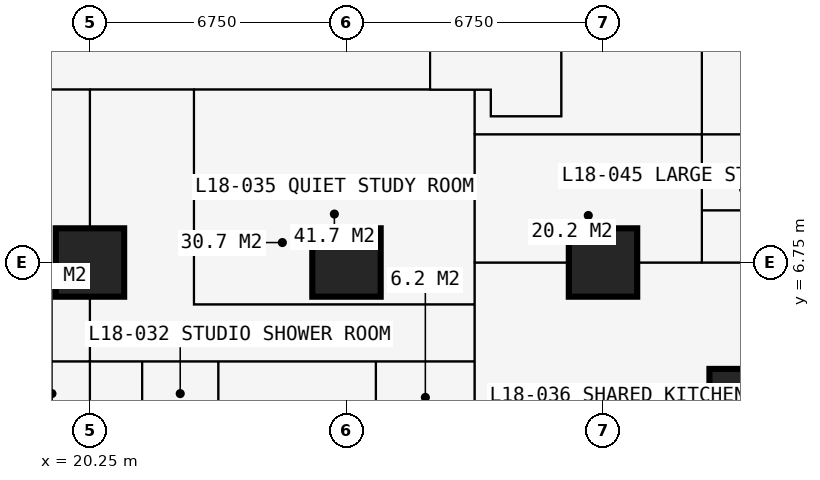
"""IFC4 building model, lengths in metres.
Left out: names, types, materials, properties, quantities, classifications, styles, units other than length and angle.
Written with IfcOpenShell. Run it as: python <this file> out.ifc"""

import sys

from ifc_helpers import new_model, si_unit, direction, frame, frame_2d, origin, origin_2d, place, context, subcontext, project, spatial, rectangle, extrude, element, fill, save


model = new_model("IFC4")
c1 = context("Model", 3, precision=1e-05, world=origin(), true_north=direction((0.0, 1.0)))
c2 = subcontext(c1, "Body", "Model", "MODEL_VIEW")
j1 = project(units=[si_unit("LENGTHUNIT", "METRE"), si_unit("PLANEANGLEUNIT", "RADIAN")], contexts=[c1])
p1 = place(None, origin())
s1 = spatial("IfcSite", under=j1, at=p1, CompositionType="ELEMENT")
p2 = place(p1, origin())
s2 = spatial("IfcBuilding", under=s1, at=p2, CompositionType="ELEMENT")
p3 = place(p2, frame((0.0, 0.0, 68.4)))
s3 = spatial("IfcBuildingStorey", under=s2, at=p3, CompositionType="ELEMENT", Elevation=68.4)
for number, where, z_axis, x_axis in (
    (1, (20.25, 6.75, 0.0), (0.0, 0.0, 1.0), (1.0, 0.0, 0.0)),
    (2, (27.0, 6.75, 0.0), (0.0, 0.0, 1.0), (1.0, 0.0, 0.0)),
    (3, (33.75, 6.75, 0.0), (0.0, 0.0, 1.0), (1.0, 0.0, 0.0)),
):
    element("IfcColumn", number, at=place(p3, frame(where, z_axis=z_axis, x_axis=x_axis)), inside=s3, PredefinedType="COLUMN", context=c2, shape_type="SweptSolid", body=[
        extrude(rectangle(XDim=1.8, YDim=1.8, at=origin_2d()), origin(), (0.0, 0.0, 1.0), 3.6),
    ])
p4 = place(p3, frame((37.125, 3.375, 0.0), z_axis=(0.0, 0.0, 1.0), x_axis=(1.0, 0.0, 0.0)))
e4 = element("IfcColumn", 4, at=p4, inside=s3, PredefinedType="COLUMN", context=c2, shape_type="SweptSolid", body=[
    extrude(rectangle(XDim=1.15, YDim=1.15, at=origin_2d()), origin(), (0.0, 0.0, 1.0), 3.6),
])
p5 = place(p3, frame((6.75, 4.15, 0.0), z_axis=(0.0, 0.0, 1.0), x_axis=(1.0, 0.0, 0.0)))
e5 = element("IfcWall", 5, at=p5, inside=s3, PredefinedType="PARTITIONING", context=c2, shape_type="SweptSolid", body=[
    extrude(rectangle(XDim=23.625, YDim=0.1, at=frame_2d((11.812, 0.0))), origin(), (0.0, 0.0, 1.0), 3.375),
])
p6 = place(p5, frame((0.2, 0.0, 0.0)))
e6 = element("IfcOpeningElement", 6, at=p6, cuts=e5, PredefinedType="OPENING", context=c2, shape_type="SweptSolid", body=[
    extrude(rectangle(XDim=0.95, YDim=2.2, at=frame_2d((0.475, 1.1))), frame((0.0, 0.06, 0.0), z_axis=(0.0, -1.0, 0.0), x_axis=(1.0, 0.0, 0.0)), (0.0, 0.0, 1.0), 0.12),
])
p7 = place(p5, frame((3.625, 0.0, 0.0)))
e7 = element("IfcOpeningElement", 7, at=p7, cuts=e5, PredefinedType="OPENING", context=c2, shape_type="SweptSolid", body=[
    extrude(rectangle(XDim=0.95, YDim=2.2, at=frame_2d((0.475, 1.1))), frame((0.0, 0.06, 0.0), z_axis=(0.0, -1.0, 0.0), x_axis=(1.0, 0.0, 0.0)), (0.0, 0.0, 1.0), 0.12),
])
p8 = place(p5, frame((7.0, 0.0, 0.0)))
e8 = element("IfcOpeningElement", 8, at=p8, cuts=e5, PredefinedType="OPENING", context=c2, shape_type="SweptSolid", body=[
    extrude(rectangle(XDim=0.95, YDim=2.2, at=frame_2d((0.475, 1.1))), frame((0.0, 0.06, 0.0), z_axis=(0.0, -1.0, 0.0), x_axis=(1.0, 0.0, 0.0)), (0.0, 0.0, 1.0), 0.12),
])
p9 = place(p5, frame((10.375, 0.0, 0.0)))
e9 = element("IfcOpeningElement", 9, at=p9, cuts=e5, PredefinedType="OPENING", context=c2, shape_type="SweptSolid", body=[
    extrude(rectangle(XDim=0.95, YDim=2.2, at=frame_2d((0.475, 1.1))), frame((0.0, 0.06, 0.0), z_axis=(0.0, -1.0, 0.0), x_axis=(1.0, 0.0, 0.0)), (0.0, 0.0, 1.0), 0.12),
])
p10 = place(p5, frame((18.475, 0.0, 0.0)))
e10 = element("IfcOpeningElement", 10, at=p10, cuts=e5, PredefinedType="OPENING", context=c2, shape_type="SweptSolid", body=[
    extrude(rectangle(XDim=0.95, YDim=2.2, at=frame_2d((0.475, 1.1))), frame((0.0, 0.06, 0.0), z_axis=(0.0, -1.0, 0.0), x_axis=(1.0, 0.0, 0.0)), (0.0, 0.0, 1.0), 0.12),
])
p11 = place(p5, frame((13.7, 0.0, 0.0)))
e11 = element("IfcOpeningElement", 11, at=p11, cuts=e5, PredefinedType="OPENING", context=c2, shape_type="SweptSolid", body=[
    extrude(rectangle(XDim=0.95, YDim=2.2, at=frame_2d((0.475, 1.1))), frame((0.0, 0.06, 0.0), z_axis=(0.0, -1.0, 0.0), x_axis=(1.0, 0.0, 0.0)), (0.0, 0.0, 1.0), 0.12),
])
p12 = place(p3, frame((10.125, 11.3, 0.0), z_axis=(0.0, 0.0, 1.0), x_axis=(1.0, 0.0, 0.0)))
e12 = element("IfcWall", 12, at=p12, inside=s3, PredefinedType="PARTITIONING", context=c2, shape_type="SweptSolid", body=[
    extrude(rectangle(XDim=20.675, YDim=0.15, at=frame_2d((10.337, 0.0))), origin(), (0.0, 0.0, 1.0), 3.375),
])
p13 = place(p12, frame((8.375, 0.0, 0.0)))
e13 = element("IfcOpeningElement", 13, at=p13, cuts=e12, PredefinedType="OPENING", context=c2, shape_type="SweptSolid", body=[
    extrude(rectangle(XDim=1.0, YDim=2.2, at=frame_2d((0.5, 1.1))), frame((0.0, 0.085, 0.0), z_axis=(0.0, -1.0, 0.0), x_axis=(1.0, 0.0, 0.0)), (0.0, 0.0, 1.0), 0.17),
])
p14 = place(p12, frame((10.975, 0.0, 0.0)))
e14 = element("IfcOpeningElement", 14, at=p14, cuts=e12, PredefinedType="OPENING", context=c2, shape_type="SweptSolid", body=[
    extrude(rectangle(XDim=1.0, YDim=2.2, at=frame_2d((0.5, 1.1))), frame((0.0, 0.085, 0.0), z_axis=(0.0, -1.0, 0.0), x_axis=(1.0, 0.0, 0.0)), (0.0, 0.0, 1.0), 0.17),
])
p15 = place(p12, frame((3.925, 0.0, 0.0)))
e15 = element("IfcOpeningElement", 15, at=p15, cuts=e12, PredefinedType="OPENING", context=c2, shape_type="SweptSolid", body=[
    extrude(rectangle(XDim=0.95, YDim=2.2, at=frame_2d((0.475, 1.1))), frame((0.0, 0.085, 0.0), z_axis=(0.0, -1.0, 0.0), x_axis=(1.0, 0.0, 0.0)), (0.0, 0.0, 1.0), 0.17),
])
p16 = place(p3, frame((20.25, -0.734, 0.0), z_axis=(0.0, 0.0, 1.0), x_axis=(0.0, 1.0, 0.0)))
e16 = element("IfcWall", 16, at=p16, inside=s3, PredefinedType="PARTITIONING", context=c2, shape_type="SweptSolid", body=[
    extrude(rectangle(XDim=12.034, YDim=0.15, at=frame_2d((6.017, 0.0))), origin(), (0.0, 0.0, 1.0), 2.61),
])
p17 = place(p3, frame((21.625, 1.95, 0.0), z_axis=(0.0, 0.0, 1.0), x_axis=(0.0, 1.0, 0.0)))
e17 = element("IfcWall", 17, at=p17, inside=s3, PredefinedType="PARTITIONING", context=c2, shape_type="SweptSolid", body=[
    extrude(rectangle(XDim=2.2, YDim=0.1, at=frame_2d((1.1, 0.0))), origin(), (0.0, 0.0, 1.0), 3.375),
])
p18 = place(p3, frame((22.988, 5.65, 0.0), z_axis=(0.0, 0.0, 1.0), x_axis=(1.0, 0.0, 0.0)))
e18 = element("IfcWall", 18, at=p18, inside=s3, PredefinedType="PARTITIONING", context=c2, shape_type="SweptSolid", body=[
    extrude(rectangle(XDim=7.387, YDim=0.15, at=frame_2d((3.694, 0.0))), origin(), (0.0, 0.0, 1.0), 3.375),
])
p19 = place(p18, frame((2.15, 0.0, 0.0)))
e19 = element("IfcOpeningElement", 19, at=p19, cuts=e18, PredefinedType="OPENING", context=c2, shape_type="SweptSolid", body=[
    extrude(rectangle(XDim=0.95, YDim=2.2, at=frame_2d((0.475, 1.1))), frame((0.0, 0.085, 0.0), z_axis=(0.0, -1.0, 0.0), x_axis=(1.0, 0.0, 0.0)), (0.0, 0.0, 1.0), 0.17),
])
p20 = place(p3, frame((22.988, 5.65, 0.0), z_axis=(0.0, 0.0, 1.0), x_axis=(0.0, 1.0, 0.0)))
e20 = element("IfcWall", 20, at=p20, inside=s3, PredefinedType="PARTITIONING", context=c2, shape_type="SweptSolid", body=[
    extrude(rectangle(XDim=5.65, YDim=0.15, at=frame_2d((2.825, 0.0))), origin(), (0.0, 0.0, 1.0), 3.375),
])
p21 = place(p3, frame((23.625, -0.734, 0.0), z_axis=(0.0, 0.0, 1.0), x_axis=(0.0, 1.0, 0.0)))
e21 = element("IfcWall", 21, at=p21, inside=s3, PredefinedType="PARTITIONING", context=c2, shape_type="SweptSolid", body=[
    extrude(rectangle(XDim=4.884, YDim=0.175, at=frame_2d((2.442, 0.0))), origin(), (0.0, 0.0, 1.0), 3.375),
])
p22 = place(p21, frame((3.334, 0.0, 0.0)))
e22 = element("IfcOpeningElement", 22, at=p22, cuts=e21, PredefinedType="OPENING", context=c2, shape_type="SweptSolid", body=[
    extrude(rectangle(XDim=0.9, YDim=2.2, at=frame_2d((0.45, 1.1))), frame((0.0, 0.097, 0.0), z_axis=(0.0, -1.0, 0.0), x_axis=(1.0, 0.0, 0.0)), (0.0, 0.0, 1.0), 0.195),
])
p23 = place(p3, frame((27.775, 1.75, 0.0), z_axis=(0.0, 0.0, 1.0), x_axis=(0.0, 1.0, 0.0)))
e23 = element("IfcWall", 23, at=p23, inside=s3, PredefinedType="PARTITIONING", context=c2, shape_type="SweptSolid", body=[
    extrude(rectangle(XDim=2.4, YDim=0.1, at=frame_2d((1.2, 0.0))), origin(), (0.0, 0.0, 1.0), 3.375),
])
p24 = place(p3, frame((29.2, 11.3, 0.0), z_axis=(0.0, 0.0, 1.0), x_axis=(0.0, 1.0, 0.0)))
e24 = element("IfcWall", 24, at=p24, inside=s3, PredefinedType="PARTITIONING", context=c2, shape_type="SweptSolid", body=[
    extrude(rectangle(XDim=17.9, YDim=0.2, at=frame_2d((8.95, 0.0))), origin(), (0.0, 0.0, 1.0), 3.375),
])
p25 = place(p24, frame((8.35, 0.0, 0.0)))
e25 = element("IfcOpeningElement", 25, at=p25, cuts=e24, PredefinedType="OPENING", context=c2, shape_type="SweptSolid", body=[
    extrude(rectangle(XDim=1.2, YDim=2.2, at=frame_2d((0.6, 1.1))), frame((0.0, 0.11, 0.0), z_axis=(0.0, -1.0, 0.0), x_axis=(1.0, 0.0, 0.0)), (0.0, 0.0, 1.0), 0.22),
])
p26 = place(p3, frame((30.375, -0.734, 0.0), z_axis=(0.0, 0.0, 1.0), x_axis=(0.0, 1.0, 0.0)))
e26 = element("IfcWall", 26, at=p26, inside=s3, PredefinedType="PARTITIONING", context=c2, shape_type="SweptSolid", body=[
    extrude(rectangle(XDim=12.034, YDim=0.15, at=frame_2d((6.017, 0.0))), origin(), (0.0, 0.0, 1.0), 3.375),
])
p27 = place(p3, frame((30.375, 6.75, 0.0), z_axis=(0.0, 0.0, 1.0), x_axis=(1.0, 0.0, 0.0)))
e27 = element("IfcWall", 27, at=p27, inside=s3, PredefinedType="PARTITIONING", context=c2, shape_type="SweptSolid", body=[
    extrude(rectangle(XDim=10.859, YDim=0.15, at=frame_2d((5.429, 0.0))), origin(), (0.0, 0.0, 1.0), 2.877),
])
p28 = place(p27, frame((1.45, 0.0, 0.0)))
e28 = element("IfcOpeningElement", 28, at=p28, cuts=e27, PredefinedType="OPENING", context=c2, shape_type="SweptSolid", body=[
    extrude(rectangle(XDim=1.0, YDim=2.2, at=frame_2d((0.5, 1.1))), frame((0.0, 0.085, 0.0), z_axis=(0.0, -1.0, 0.0), x_axis=(1.0, 0.0, 0.0)), (0.0, 0.0, 1.0), 0.17),
])
p29 = place(p3, frame((30.375, 10.125, 0.0), z_axis=(0.0, 0.0, 1.0), x_axis=(1.0, 0.0, 0.0)))
e29 = element("IfcWall", 29, at=p29, inside=s3, PredefinedType="PARTITIONING", context=c2, shape_type="SweptSolid", body=[
    extrude(rectangle(XDim=10.859, YDim=0.15, at=frame_2d((5.429, 0.0))), origin(), (0.0, 0.0, 1.0), 3.375),
])
p30 = place(p29, frame((2.5, 0.0, 0.0)))
e30 = element("IfcOpeningElement", 30, at=p30, cuts=e29, PredefinedType="OPENING", context=c2, shape_type="SweptSolid", body=[
    extrude(rectangle(XDim=1.0, YDim=2.2, at=frame_2d((0.5, 1.1))), frame((0.0, 0.085, 0.0), z_axis=(0.0, -1.0, 0.0), x_axis=(1.0, 0.0, 0.0)), (0.0, 0.0, 1.0), 0.17),
])
p31 = place(p3, frame((30.8, 10.6, 0.0), z_axis=(0.0, 0.0, 1.0), x_axis=(0.0, 1.0, 0.0)))
e31 = element("IfcWall", 31, at=p31, inside=s3, PredefinedType="PARTITIONING", context=c2, shape_type="SweptSolid", body=[
    extrude(rectangle(XDim=0.7, YDim=0.15, at=frame_2d((0.35, 0.0))), origin(), (0.0, 0.0, 1.0), 3.375),
])
p32 = place(p3, frame((30.8, 10.6, 0.0), z_axis=(0.0, 0.0, 1.0), x_axis=(1.0, 0.0, 0.0)))
e32 = element("IfcWall", 32, at=p32, inside=s3, PredefinedType="PARTITIONING", context=c2, shape_type="SweptSolid", body=[
    extrude(rectangle(XDim=1.85, YDim=0.15, at=frame_2d((0.925, 0.0))), origin(), (0.0, 0.0, 1.0), 3.375),
])
p33 = place(p3, frame((32.65, 10.6, 0.0), z_axis=(0.0, 0.0, 1.0), x_axis=(0.0, 1.0, 0.0)))
e33 = element("IfcWall", 33, at=p33, inside=s3, PredefinedType="SHEAR", context=c2, shape_type="SweptSolid", body=[
    extrude(rectangle(XDim=9.3, YDim=0.1, at=frame_2d((4.65, 0.0))), origin(), (0.0, 0.0, 1.0), 3.375),
])
p34 = place(p33, frame((0.5, 0.0, 0.0)))
e34 = element("IfcOpeningElement", 34, at=p34, cuts=e33, PredefinedType="OPENING", context=c2, shape_type="SweptSolid", body=[
    extrude(rectangle(XDim=1.0, YDim=2.2, at=frame_2d((0.5, 1.1))), frame((0.0, 0.06, 0.0), z_axis=(0.0, -1.0, 0.0), x_axis=(1.0, 0.0, 0.0)), (0.0, 0.0, 1.0), 0.12),
])
p35 = place(p3, frame((36.35, 6.75, 0.0), z_axis=(0.0, 0.0, 1.0), x_axis=(0.0, 1.0, 0.0)))
e35 = element("IfcWall", 35, at=p35, inside=s3, PredefinedType="PARTITIONING", context=c2, shape_type="SweptSolid", body=[
    extrude(rectangle(XDim=23.625, YDim=0.15, at=frame_2d((11.812, 0.0))), origin(), (0.0, 0.0, 1.0), 3.375),
])
p36 = place(p35, frame((0.2, 0.0, 0.0)))
e36 = element("IfcOpeningElement", 36, at=p36, cuts=e35, PredefinedType="OPENING", context=c2, shape_type="SweptSolid", body=[
    extrude(rectangle(XDim=0.95, YDim=2.2, at=frame_2d((0.475, 1.1))), frame((0.0, 0.085, 0.0), z_axis=(0.0, -1.0, 0.0), x_axis=(1.0, 0.0, 0.0)), (0.0, 0.0, 1.0), 0.17),
])
p37 = place(p35, frame((18.475, 0.0, 0.0)))
e37 = element("IfcOpeningElement", 37, at=p37, cuts=e35, PredefinedType="OPENING", context=c2, shape_type="SweptSolid", body=[
    extrude(rectangle(XDim=0.95, YDim=2.2, at=frame_2d((0.475, 1.1))), frame((0.0, 0.085, 0.0), z_axis=(0.0, -1.0, 0.0), x_axis=(1.0, 0.0, 0.0)), (0.0, 0.0, 1.0), 0.17),
])
p38 = place(p35, frame((11.725, 0.0, 0.0)))
e38 = element("IfcOpeningElement", 38, at=p38, cuts=e35, PredefinedType="OPENING", context=c2, shape_type="SweptSolid", body=[
    extrude(rectangle(XDim=0.95, YDim=2.2, at=frame_2d((0.475, 1.1))), frame((0.0, 0.085, 0.0), z_axis=(0.0, -1.0, 0.0), x_axis=(1.0, 0.0, 0.0)), (0.0, 0.0, 1.0), 0.17),
])
p39 = place(p35, frame((4.975, 0.0, 0.0)))
e39 = element("IfcOpeningElement", 39, at=p39, cuts=e35, PredefinedType="OPENING", context=c2, shape_type="SweptSolid", body=[
    extrude(rectangle(XDim=0.95, YDim=2.2, at=frame_2d((0.475, 1.1))), frame((0.0, 0.085, 0.0), z_axis=(0.0, -1.0, 0.0), x_axis=(1.0, 0.0, 0.0)), (0.0, 0.0, 1.0), 0.17),
])
p40 = place(p3, frame((36.35, 8.125, 0.0), z_axis=(0.0, 0.0, 1.0), x_axis=(1.0, 0.0, 0.0)))
e40 = element("IfcWall", 40, at=p40, inside=s3, PredefinedType="PARTITIONING", context=c2, shape_type="SweptSolid", body=[
    extrude(rectangle(XDim=2.2, YDim=0.1, at=frame_2d((1.1, 0.0))), origin(), (0.0, 0.0, 1.0), 3.375),
])
p41 = place(p40, frame((0.65, 0.0, 0.0)))
e41 = element("IfcOpeningElement", 41, at=p41, cuts=e40, PredefinedType="OPENING", context=c2, shape_type="SweptSolid", body=[
    extrude(rectangle(XDim=0.9, YDim=2.2, at=frame_2d((0.45, 1.1))), frame((0.0, 0.06, 0.0), z_axis=(0.0, -1.0, 0.0), x_axis=(1.0, 0.0, 0.0)), (0.0, 0.0, 1.0), 0.12),
])
p42 = place(p13, origin())
e42 = element("IfcDoor", 42, at=p42, inside=s3, OperationType="SINGLE_SWING_LEFT", PredefinedType="DOOR", context=c2, shape_type="SweptSolid", body=[
    extrude(rectangle(XDim=1.0, YDim=2.2, at=frame_2d((0.5, 1.1))), frame((0.0, 0.025, 0.0), z_axis=(0.0, -1.0, 0.0), x_axis=(1.0, 0.0, 0.0)), (0.0, 0.0, 1.0), 0.05),
])
fill(e13, e42)
p43 = place(p10, origin())
e43 = element("IfcDoor", 43, at=p43, inside=s3, OperationType="SINGLE_SWING_LEFT", PredefinedType="DOOR", context=c2, shape_type="SweptSolid", body=[
    extrude(rectangle(XDim=0.95, YDim=2.2, at=frame_2d((0.475, 1.1))), frame((0.0, 0.025, 0.0), z_axis=(0.0, -1.0, 0.0), x_axis=(1.0, 0.0, 0.0)), (0.0, 0.0, 1.0), 0.05),
])
fill(e10, e43)
p44 = place(p11, origin())
e44 = element("IfcDoor", 44, at=p44, inside=s3, OperationType="SINGLE_SWING_LEFT", PredefinedType="DOOR", context=c2, shape_type="SweptSolid", body=[
    extrude(rectangle(XDim=0.95, YDim=2.2, at=frame_2d((0.475, 1.1))), frame((0.0, 0.025, 0.0), z_axis=(0.0, -1.0, 0.0), x_axis=(1.0, 0.0, 0.0)), (0.0, 0.0, 1.0), 0.05),
])
fill(e11, e44)
p45 = place(p22, origin())
e45 = element("IfcDoor", 45, at=p45, inside=s3, OperationType="SINGLE_SWING_RIGHT", PredefinedType="DOOR", context=c2, shape_type="SweptSolid", body=[
    extrude(rectangle(XDim=0.9, YDim=2.2, at=frame_2d((0.45, 1.1))), frame((0.0, 0.025, 0.0), z_axis=(0.0, -1.0, 0.0), x_axis=(1.0, 0.0, 0.0)), (0.0, 0.0, 1.0), 0.05),
])
fill(e22, e45)
p46 = place(p14, origin())
e46 = element("IfcDoor", 46, at=p46, inside=s3, OperationType="SINGLE_SWING_LEFT", PredefinedType="DOOR", context=c2, shape_type="SweptSolid", body=[
    extrude(rectangle(XDim=1.0, YDim=2.2, at=frame_2d((0.5, 1.1))), frame((0.0, 0.025, 0.0), z_axis=(0.0, -1.0, 0.0), x_axis=(1.0, 0.0, 0.0)), (0.0, 0.0, 1.0), 0.05),
])
fill(e14, e46)
p47 = place(p19, origin())
e47 = element("IfcDoor", 47, at=p47, inside=s3, OperationType="SINGLE_SWING_LEFT", PredefinedType="DOOR", context=c2, shape_type="SweptSolid", body=[
    extrude(rectangle(XDim=0.95, YDim=2.2, at=frame_2d((0.475, 1.1))), frame((0.0, 0.025, 0.0), z_axis=(0.0, -1.0, 0.0), x_axis=(1.0, 0.0, 0.0)), (0.0, 0.0, 1.0), 0.05),
])
fill(e19, e47)
p48 = place(p28, origin())
e48 = element("IfcDoor", 48, at=p48, inside=s3, OperationType="SINGLE_SWING_LEFT", PredefinedType="DOOR", context=c2, shape_type="SweptSolid", body=[
    extrude(rectangle(XDim=1.0, YDim=2.2, at=frame_2d((0.5, 1.1))), frame((0.0, 0.025, 0.0), z_axis=(0.0, -1.0, 0.0), x_axis=(1.0, 0.0, 0.0)), (0.0, 0.0, 1.0), 0.05),
])
fill(e28, e48)
p49 = place(p36, origin())
e49 = element("IfcDoor", 49, at=p49, inside=s3, OperationType="SINGLE_SWING_LEFT", PredefinedType="DOOR", context=c2, shape_type="SweptSolid", body=[
    extrude(rectangle(XDim=0.95, YDim=2.2, at=frame_2d((0.475, 1.1))), frame((0.0, 0.025, 0.0), z_axis=(0.0, -1.0, 0.0), x_axis=(1.0, 0.0, 0.0)), (0.0, 0.0, 1.0), 0.05),
])
fill(e36, e49)
p50 = place(p41, origin())
e50 = element("IfcDoor", 50, at=p50, inside=s3, OperationType="SINGLE_SWING_RIGHT", PredefinedType="DOOR", context=c2, shape_type="SweptSolid", body=[
    extrude(rectangle(XDim=0.9, YDim=2.2, at=frame_2d((0.45, 1.1))), frame((0.0, 0.025, 0.0), z_axis=(0.0, -1.0, 0.0), x_axis=(1.0, 0.0, 0.0)), (0.0, 0.0, 1.0), 0.05),
])
fill(e41, e50)
p51 = place(p30, origin())
e51 = element("IfcDoor", 51, at=p51, inside=s3, OperationType="SINGLE_SWING_LEFT", PredefinedType="DOOR", context=c2, shape_type="SweptSolid", body=[
    extrude(rectangle(XDim=1.0, YDim=2.2, at=frame_2d((0.5, 1.1))), frame((0.0, 0.025, 0.0), z_axis=(0.0, -1.0, 0.0), x_axis=(1.0, 0.0, 0.0)), (0.0, 0.0, 1.0), 0.05),
])
fill(e30, e51)
p52 = place(p39, origin())
e52 = element("IfcDoor", 52, at=p52, inside=s3, OperationType="SINGLE_SWING_LEFT", PredefinedType="DOOR", context=c2, shape_type="SweptSolid", body=[
    extrude(rectangle(XDim=0.95, YDim=2.2, at=frame_2d((0.475, 1.1))), frame((0.0, 0.025, 0.0), z_axis=(0.0, -1.0, 0.0), x_axis=(1.0, 0.0, 0.0)), (0.0, 0.0, 1.0), 0.05),
])
fill(e39, e52)
p53 = place(p34, origin())
e53 = element("IfcDoor", 53, at=p53, inside=s3, OperationType="SINGLE_SWING_LEFT", PredefinedType="DOOR", context=c2, shape_type="SweptSolid", body=[
    extrude(rectangle(XDim=1.0, YDim=2.2, at=frame_2d((0.5, 1.1))), frame((0.0, 0.025, 0.0), z_axis=(0.0, -1.0, 0.0), x_axis=(1.0, 0.0, 0.0)), (0.0, 0.0, 1.0), 0.05),
])
fill(e34, e53)
save(model, sys.argv[1])
